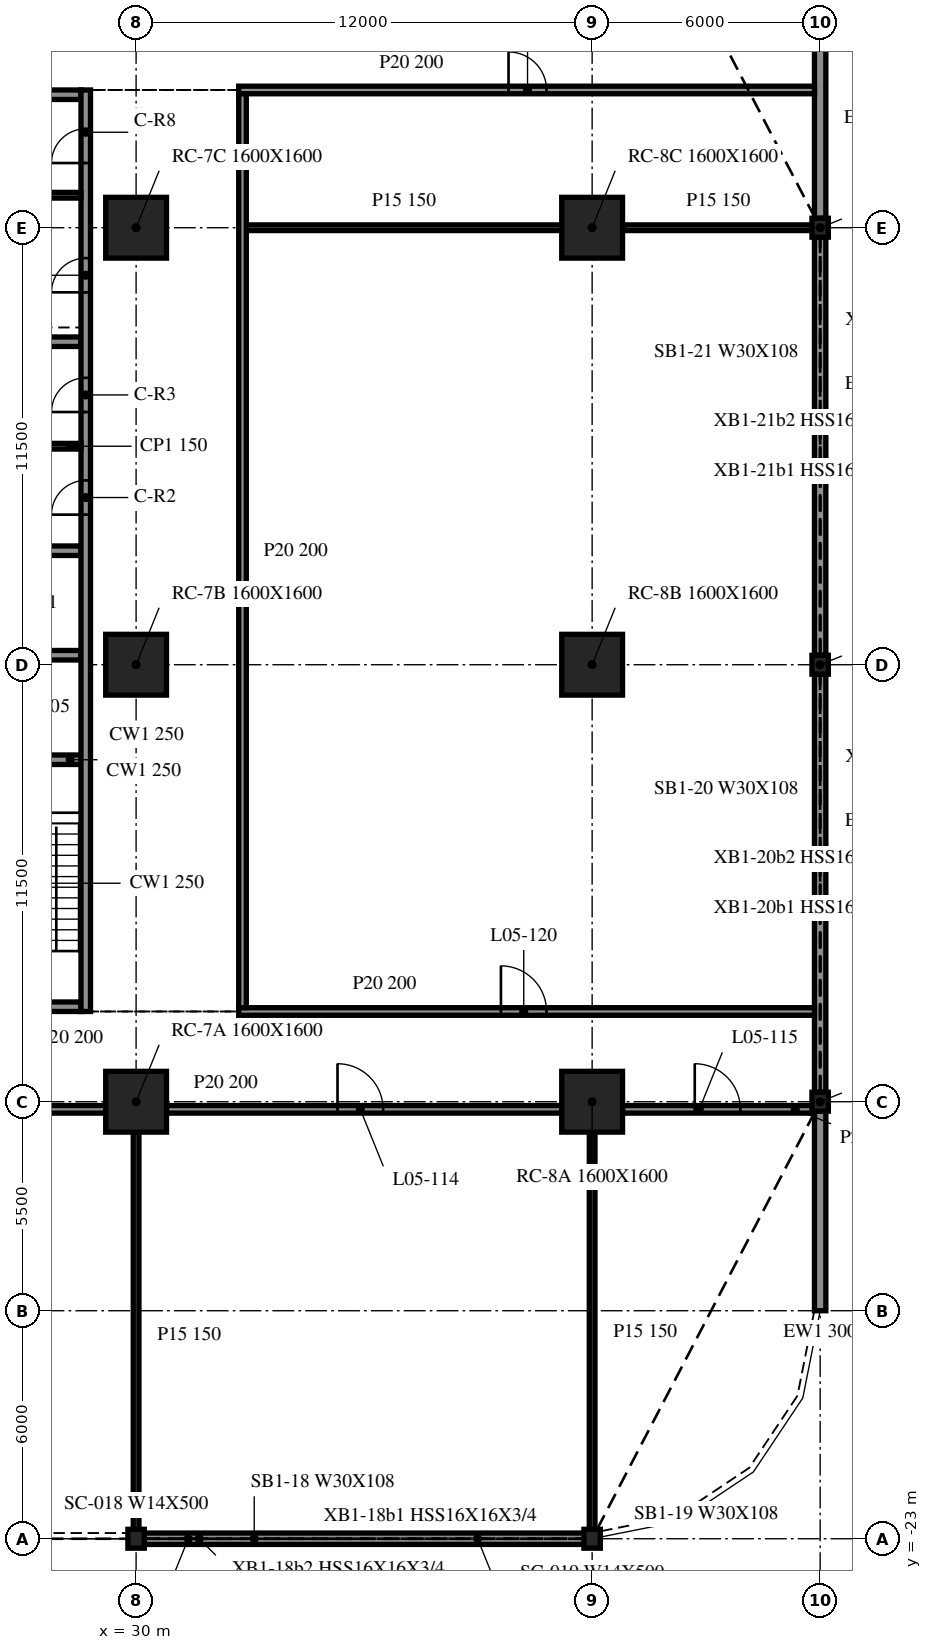
"""IFC4 building model, lengths in metres.
Left out: names, types, materials, properties, quantities, classifications, styles, units other than length and angle.
Written with IfcOpenShell. Run it as: python <this file> out.ifc"""

import sys

from ifc_helpers import new_model, si_unit, direction, frame, frame_2d, origin, origin_2d, place, context, subcontext, project, spatial, rectangle, i_section, extrude, element, fill, save


model = new_model("IFC4")
c1 = context("Model", 3, precision=1e-05, world=origin(), true_north=direction((0.0, 1.0)))
c2 = subcontext(c1, "Body", "Model", "MODEL_VIEW")
j1 = project(units=[si_unit("LENGTHUNIT", "METRE"), si_unit("PLANEANGLEUNIT", "RADIAN")], contexts=[c1])
p1 = place(None, origin())
s1 = spatial("IfcSite", under=j1, at=p1, CompositionType="ELEMENT")
p2 = place(p1, origin())
s2 = spatial("IfcBuilding", under=s1, at=p2, CompositionType="ELEMENT")
p3 = place(p2, frame((0.0, 0.0, 24.4)))
s3 = spatial("IfcBuildingStorey", under=s2, at=p3, CompositionType="ELEMENT", Elevation=24.4)
for number, where, z_axis, x_axis in (
    (1, (30.0, -11.5, -0.34), (0.0, 0.0, 1.0), (1.0, 0.0, 0.0)),
    (2, (30.0, 0.0, -0.34), (0.0, 0.0, 1.0), (1.0, 0.0, 0.0)),
    (3, (30.0, 11.5, -0.34), (0.0, 0.0, 1.0), (1.0, 0.0, 0.0)),
    (4, (42.0, -11.5, -0.34), (0.0, 0.0, 1.0), (1.0, 0.0, 0.0)),
    (5, (42.0, 0.0, -0.34), (0.0, 0.0, 1.0), (1.0, 0.0, 0.0)),
    (6, (42.0, 11.5, -0.34), (0.0, 0.0, 1.0), (1.0, 0.0, 0.0)),
):
    element("IfcColumn", number, at=place(p3, frame(where, z_axis=z_axis, x_axis=x_axis)), inside=s3, PredefinedType="COLUMN", context=c2, shape_type="SweptSolid", body=[
        extrude(rectangle(XDim=1.6, YDim=1.6, at=origin_2d()), origin(), (0.0, 0.0, 1.0), 4.3),
    ])
for number, where, z_axis, x_axis in (
    (7, (30.0, -23.0, -0.34), (0.0, 0.0, 1.0), (1.0, 0.0, 0.0)),
    (8, (42.0, -23.0, -0.34), (0.0, 0.0, 1.0), (1.0, 0.0, 0.0)),
    (9, (48.0, -11.5, -0.34), (0.0, 0.0, 1.0), (1.0, 0.0, 0.0)),
    (10, (48.0, 0.0, -0.34), (0.0, 0.0, 1.0), (1.0, 0.0, 0.0)),
    (11, (48.0, 11.5, -0.34), (0.0, 0.0, 1.0), (1.0, 0.0, 0.0)),
):
    element("IfcColumn", number, at=place(p3, frame(where, z_axis=z_axis, x_axis=x_axis)), inside=s3, PredefinedType="COLUMN", context=c2, shape_type="SweptSolid", body=[
        extrude(i_section(OverallWidth=0.432, OverallDepth=0.498, WebThickness=0.056, FlangeThickness=0.089, at=origin_2d()), origin(), (0.0, 0.0, 1.0), 4.3),
    ])
p4 = place(p3, frame((30.028, -23.0, 0.0), z_axis=(0.0, 0.0, 1.0), x_axis=(1.0, 0.0, 0.0)))
e12 = element("IfcWall", 12, at=p4, inside=s3, PredefinedType="NOTDEFINED", context=c2, shape_type="SweptSolid", body=[
    extrude(rectangle(XDim=11.944, YDim=0.3, at=frame_2d((5.972, 0.0))), origin(), (0.0, 0.0, 1.0), 3.203),
])
p5 = place(p3, frame((48.0, -17.0, 0.0), z_axis=(0.0, 0.0, 1.0), x_axis=(0.0, 1.0, 0.0)))
e13 = element("IfcWall", 13, at=p5, inside=s3, PredefinedType="NOTDEFINED", context=c2, shape_type="SweptSolid", body=[
    extrude(rectangle(XDim=5.251, YDim=0.3, at=frame_2d((2.625, 0.0))), origin(), (0.0, 0.0, 1.0), 3.203),
])
for number, where, z_axis, x_axis in (
    (14, (48.0, -11.251, 0.0), (0.0, 0.0, 1.0), (0.0, 1.0, 0.0)),
    (15, (48.0, 0.249, 0.0), (0.0, 0.0, 1.0), (0.0, 1.0, 0.0)),
):
    element("IfcWall", number, at=place(p3, frame(where, z_axis=z_axis, x_axis=x_axis)), inside=s3, PredefinedType="NOTDEFINED", context=c2, shape_type="SweptSolid", body=[
        extrude(rectangle(XDim=11.002, YDim=0.3, at=frame_2d((5.501, 0.0))), origin(), (0.0, 0.0, 1.0), 3.203),
    ])
p6 = place(p3, frame((48.0, 11.749, 0.0), z_axis=(0.0, 0.0, 1.0), x_axis=(0.0, 1.0, 0.0)))
e16 = element("IfcWall", 16, at=p6, inside=s3, PredefinedType="NOTDEFINED", context=c2, shape_type="SweptSolid", body=[
    extrude(rectangle(XDim=5.251, YDim=0.3, at=frame_2d((2.625, 0.0))), origin(), (0.0, 0.0, 1.0), 3.203),
])
p7 = place(p3, frame((28.675, -9.125, 0.0), z_axis=(0.0, 0.0, 1.0), x_axis=(0.0, 1.0, 0.0)))
e17 = element("IfcWall", 17, at=p7, inside=s3, PredefinedType="SOLIDWALL", context=c2, shape_type="SweptSolid", body=[
    extrude(rectangle(XDim=24.25, YDim=0.25, at=frame_2d((12.125, 0.0))), origin(), (0.0, 0.0, 1.0), 3.96),
])
p8 = place(p7, frame((13.075, 0.0, 0.0)))
e18 = element("IfcOpeningElement", 18, at=p8, cuts=e17, PredefinedType="OPENING", context=c2, shape_type="SweptSolid", body=[
    extrude(rectangle(XDim=0.9, YDim=2.1, at=frame_2d((0.45, 1.05))), frame((0.0, 0.135, 0.0), z_axis=(0.0, -1.0, 0.0), x_axis=(1.0, 0.0, 0.0)), (0.0, 0.0, 1.0), 0.27),
])
p9 = place(p7, frame((15.775, 0.0, 0.0)))
e19 = element("IfcOpeningElement", 19, at=p9, cuts=e17, PredefinedType="OPENING", context=c2, shape_type="SweptSolid", body=[
    extrude(rectangle(XDim=0.9, YDim=2.1, at=frame_2d((0.45, 1.05))), frame((0.0, 0.135, 0.0), z_axis=(0.0, -1.0, 0.0), x_axis=(1.0, 0.0, 0.0)), (0.0, 0.0, 1.0), 0.27),
])
p10 = place(p7, frame((18.925, 0.0, 0.0)))
e20 = element("IfcOpeningElement", 20, at=p10, cuts=e17, PredefinedType="OPENING", context=c2, shape_type="SweptSolid", body=[
    extrude(rectangle(XDim=0.9, YDim=2.1, at=frame_2d((0.45, 1.05))), frame((0.0, 0.135, 0.0), z_axis=(0.0, -1.0, 0.0), x_axis=(1.0, 0.0, 0.0)), (0.0, 0.0, 1.0), 0.27),
])
p11 = place(p7, frame((22.327, 0.0, 0.0)))
e21 = element("IfcOpeningElement", 21, at=p11, cuts=e17, PredefinedType="OPENING", context=c2, shape_type="SweptSolid", body=[
    extrude(rectangle(XDim=0.9, YDim=2.1, at=frame_2d((0.45, 1.05))), frame((0.0, 0.135, 0.0), z_axis=(0.0, -1.0, 0.0), x_axis=(1.0, 0.0, 0.0)), (0.0, 0.0, 1.0), 0.27),
])
p12 = place(p3, frame((28.55, -9.0, 0.0), z_axis=(0.0, 0.0, 1.0), x_axis=(-1.0, 0.0, 0.0)))
e22 = element("IfcWall", 22, at=p12, inside=s3, PredefinedType="SOLIDWALL", context=c2, shape_type="SweptSolid", body=[
    extrude(rectangle(XDim=9.1, YDim=0.25, at=frame_2d((4.55, 0.0))), origin(), (0.0, 0.0, 1.0), 3.96),
])
p13 = place(p12, frame((3.65, 0.0, 0.0)))
e23 = element("IfcOpeningElement", 23, at=p13, cuts=e22, PredefinedType="OPENING", context=c2, shape_type="SweptSolid", body=[
    extrude(rectangle(XDim=1.8, YDim=2.1, at=frame_2d((0.9, 1.05))), frame((0.0, 0.135, 0.0), z_axis=(0.0, -1.0, 0.0), x_axis=(1.0, 0.0, 0.0)), (0.0, 0.0, 1.0), 0.27),
])
p14 = place(p3, frame((19.45, 15.0, 0.0), z_axis=(0.0, 0.0, 1.0), x_axis=(1.0, 0.0, 0.0)))
e24 = element("IfcWall", 24, at=p14, inside=s3, PredefinedType="SOLIDWALL", context=c2, shape_type="SweptSolid", body=[
    extrude(rectangle(XDim=9.1, YDim=0.25, at=frame_2d((4.55, 0.0))), origin(), (0.0, 0.0, 1.0), 3.96),
])
p15 = place(p14, frame((3.65, 0.0, 0.0)))
e25 = element("IfcOpeningElement", 25, at=p15, cuts=e24, PredefinedType="OPENING", context=c2, shape_type="SweptSolid", body=[
    extrude(rectangle(XDim=1.8, YDim=2.1, at=frame_2d((0.9, 1.05))), frame((0.0, 0.135, 0.0), z_axis=(0.0, -1.0, 0.0), x_axis=(1.0, 0.0, 0.0)), (0.0, 0.0, 1.0), 0.27),
])
for number, where, z_axis, x_axis in (
    (26, (25.7, -2.5, 0.0), (0.0, 0.0, 1.0), (1.0, 0.0, 0.0)),
    (27, (25.7, 0.25, 0.0), (0.0, 0.0, 1.0), (1.0, 0.0, 0.0)),
    (28, (25.7, 3.0, 0.0), (0.0, 0.0, 1.0), (1.0, 0.0, 0.0)),
    (29, (25.7, 8.5, 0.0), (0.0, 0.0, 1.0), (1.0, 0.0, 0.0)),
):
    element("IfcWall", number, at=place(p3, frame(where, z_axis=z_axis, x_axis=x_axis)), inside=s3, PredefinedType="SOLIDWALL", context=c2, shape_type="SweptSolid", body=[
        extrude(rectangle(XDim=2.85, YDim=0.25, at=frame_2d((1.425, 0.0))), origin(), (0.0, 0.0, 1.0), 3.96),
    ])
for number, where, z_axis, x_axis in (
    (30, (25.7, 5.75, 0.0), (0.0, 0.0, 1.0), (1.0, 0.0, 0.0)),
    (31, (25.7, 12.355, 0.0), (0.0, 0.0, 1.0), (1.0, 0.0, 0.0)),
):
    element("IfcWall", number, at=place(p3, frame(where, z_axis=z_axis, x_axis=x_axis)), inside=s3, PredefinedType="PARTITIONING", context=c2, shape_type="SweptSolid", body=[
        extrude(rectangle(XDim=2.85, YDim=0.15, at=frame_2d((1.425, 0.0))), origin(), (0.0, 0.0, 1.0), 3.96),
    ])
p16 = place(p3, frame((18.8, -11.7, 0.0), z_axis=(0.0, 0.0, 1.0), x_axis=(1.0, 0.0, 0.0)))
e32 = element("IfcWall", 32, at=p16, inside=s3, PredefinedType="PARTITIONING", context=c2, shape_type="SweptSolid", body=[
    extrude(rectangle(XDim=10.4, YDim=0.2, at=frame_2d((5.2, 0.0))), origin(), (0.0, 0.0, 1.0), 3.96),
])
p17 = place(p16, frame((0.9, 0.0, 0.0)))
e33 = element("IfcOpeningElement", 33, at=p17, cuts=e32, PredefinedType="OPENING", context=c2, shape_type="SweptSolid", body=[
    extrude(rectangle(XDim=1.0, YDim=2.1, at=frame_2d((0.5, 1.05))), frame((0.0, 0.11, 0.0), z_axis=(0.0, -1.0, 0.0), x_axis=(1.0, 0.0, 0.0)), (0.0, 0.0, 1.0), 0.22),
])
p18 = place(p16, frame((3.7, 0.0, 0.0)))
e34 = element("IfcOpeningElement", 34, at=p18, cuts=e32, PredefinedType="OPENING", context=c2, shape_type="SweptSolid", body=[
    extrude(rectangle(XDim=1.2, YDim=2.1, at=frame_2d((0.6, 1.05))), frame((0.0, 0.11, 0.0), z_axis=(0.0, -1.0, 0.0), x_axis=(1.0, 0.0, 0.0)), (0.0, 0.0, 1.0), 0.22),
])
p19 = place(p16, frame((5.5, 0.0, 0.0)))
e35 = element("IfcOpeningElement", 35, at=p19, cuts=e32, PredefinedType="OPENING", context=c2, shape_type="SweptSolid", body=[
    extrude(rectangle(XDim=1.2, YDim=2.1, at=frame_2d((0.6, 1.05))), frame((0.0, 0.11, 0.0), z_axis=(0.0, -1.0, 0.0), x_axis=(1.0, 0.0, 0.0)), (0.0, 0.0, 1.0), 0.22),
])
p20 = place(p3, frame((30.8, -11.7, 0.0), z_axis=(0.0, 0.0, 1.0), x_axis=(1.0, 0.0, 0.0)))
e36 = element("IfcWall", 36, at=p20, inside=s3, PredefinedType="PARTITIONING", context=c2, shape_type="SweptSolid", body=[
    extrude(rectangle(XDim=10.4, YDim=0.2, at=frame_2d((5.2, 0.0))), origin(), (0.0, 0.0, 1.0), 3.96),
])
p21 = place(p20, frame((4.5, 0.0, 0.0)))
e37 = element("IfcOpeningElement", 37, at=p21, cuts=e36, PredefinedType="OPENING", context=c2, shape_type="SweptSolid", body=[
    extrude(rectangle(XDim=1.2, YDim=2.1, at=frame_2d((0.6, 1.05))), frame((0.0, 0.11, 0.0), z_axis=(0.0, -1.0, 0.0), x_axis=(1.0, 0.0, 0.0)), (0.0, 0.0, 1.0), 0.22),
])
p22 = place(p3, frame((42.8, -11.7, 0.0), z_axis=(0.0, 0.0, 1.0), x_axis=(1.0, 0.0, 0.0)))
e38 = element("IfcWall", 38, at=p22, inside=s3, PredefinedType="PARTITIONING", context=c2, shape_type="SweptSolid", body=[
    extrude(rectangle(XDim=5.05, YDim=0.2, at=frame_2d((2.525, 0.0))), origin(), (0.0, 0.0, 1.0), 3.96),
])
p23 = place(p22, frame((1.9, 0.0, 0.0)))
e39 = element("IfcOpeningElement", 39, at=p23, cuts=e38, PredefinedType="OPENING", context=c2, shape_type="SweptSolid", body=[
    extrude(rectangle(XDim=1.2, YDim=2.1, at=frame_2d((0.6, 1.05))), frame((0.0, 0.11, 0.0), z_axis=(0.0, -1.0, 0.0), x_axis=(1.0, 0.0, 0.0)), (0.0, 0.0, 1.0), 0.22),
])
p24 = place(p3, frame((32.7, -9.125, 0.0), z_axis=(0.0, 0.0, 1.0), x_axis=(1.0, 0.0, 0.0)))
e40 = element("IfcWall", 40, at=p24, inside=s3, PredefinedType="PARTITIONING", context=c2, shape_type="SweptSolid", body=[
    extrude(rectangle(XDim=15.15, YDim=0.2, at=frame_2d((7.575, 0.0))), origin(), (0.0, 0.0, 1.0), 3.96),
])
p25 = place(p24, frame((6.9, 0.0, 0.0)))
e41 = element("IfcOpeningElement", 41, at=p25, cuts=e40, PredefinedType="OPENING", context=c2, shape_type="SweptSolid", body=[
    extrude(rectangle(XDim=1.2, YDim=2.1, at=frame_2d((0.6, 1.05))), frame((0.0, 0.11, 0.0), z_axis=(0.0, -1.0, 0.0), x_axis=(1.0, 0.0, 0.0)), (0.0, 0.0, 1.0), 0.22),
])
p26 = place(p3, frame((32.9, 11.5, 0.0), z_axis=(0.0, 0.0, 1.0), x_axis=(1.0, 0.0, 0.0)))
e42 = element("IfcWall", 42, at=p26, inside=s3, PredefinedType="PARTITIONING", context=c2, shape_type="SweptSolid", body=[
    extrude(rectangle(XDim=8.3, YDim=0.15, at=frame_2d((4.15, 0.0))), origin(), (0.0, 0.0, 1.0), 3.96),
])
p27 = place(p3, frame((42.8, 11.5, 0.0), z_axis=(0.0, 0.0, 1.0), x_axis=(1.0, 0.0, 0.0)))
e43 = element("IfcWall", 43, at=p27, inside=s3, PredefinedType="PARTITIONING", context=c2, shape_type="SweptSolid", body=[
    extrude(rectangle(XDim=5.05, YDim=0.15, at=frame_2d((2.525, 0.0))), origin(), (0.0, 0.0, 1.0), 3.96),
])
p28 = place(p3, frame((32.7, 15.125, 0.0), z_axis=(0.0, 0.0, 1.0), x_axis=(1.0, 0.0, 0.0)))
e44 = element("IfcWall", 44, at=p28, inside=s3, PredefinedType="PARTITIONING", context=c2, shape_type="SweptSolid", body=[
    extrude(rectangle(XDim=15.15, YDim=0.2, at=frame_2d((7.575, 0.0))), origin(), (0.0, 0.0, 1.0), 3.96),
])
p29 = place(p28, frame((7.1, 0.0, 0.0)))
e45 = element("IfcOpeningElement", 45, at=p29, cuts=e44, PredefinedType="OPENING", context=c2, shape_type="SweptSolid", body=[
    extrude(rectangle(XDim=1.0, YDim=2.1, at=frame_2d((0.5, 1.05))), frame((0.0, 0.11, 0.0), z_axis=(0.0, -1.0, 0.0), x_axis=(1.0, 0.0, 0.0)), (0.0, 0.0, 1.0), 0.22),
])
p30 = place(p3, frame((30.0, -22.975, 0.0), z_axis=(0.0, 0.0, 1.0), x_axis=(0.0, 1.0, 0.0)))
e46 = element("IfcWall", 46, at=p30, inside=s3, PredefinedType="PARTITIONING", context=c2, shape_type="SweptSolid", body=[
    extrude(rectangle(XDim=10.675, YDim=0.15, at=frame_2d((5.337, 0.0))), origin(), (0.0, 0.0, 1.0), 3.96),
])
p31 = place(p3, frame((32.8, -9.025, 0.0), z_axis=(0.0, 0.0, 1.0), x_axis=(0.0, 1.0, 0.0)))
e47 = element("IfcWall", 47, at=p31, inside=s3, PredefinedType="PARTITIONING", context=c2, shape_type="SweptSolid", body=[
    extrude(rectangle(XDim=24.05, YDim=0.2, at=frame_2d((12.025, 0.0))), origin(), (0.0, 0.0, 1.0), 3.96),
])
p32 = place(p3, frame((42.0, -22.847, 0.0), z_axis=(0.0, 0.0, 1.0), x_axis=(0.0, 1.0, 0.0)))
e48 = element("IfcWall", 48, at=p32, inside=s3, PredefinedType="PARTITIONING", context=c2, shape_type="SweptSolid", body=[
    extrude(rectangle(XDim=10.547, YDim=0.15, at=frame_2d((5.273, 0.0))), origin(), (0.0, 0.0, 1.0), 3.96),
])
p33 = place(p8, origin())
e49 = element("IfcDoor", 49, at=p33, inside=s3, OperationType="SINGLE_SWING_RIGHT", PredefinedType="DOOR", context=c2, shape_type="SweptSolid", body=[
    extrude(rectangle(XDim=0.9, YDim=2.1, at=frame_2d((0.45, 1.05))), frame((0.0, 0.025, 0.0), z_axis=(0.0, -1.0, 0.0), x_axis=(1.0, 0.0, 0.0)), (0.0, 0.0, 1.0), 0.05),
])
fill(e18, e49)
p34 = place(p9, origin())
e50 = element("IfcDoor", 50, at=p34, inside=s3, OperationType="SINGLE_SWING_LEFT", PredefinedType="DOOR", context=c2, shape_type="SweptSolid", body=[
    extrude(rectangle(XDim=0.9, YDim=2.1, at=frame_2d((0.45, 1.05))), frame((0.0, 0.025, 0.0), z_axis=(0.0, -1.0, 0.0), x_axis=(1.0, 0.0, 0.0)), (0.0, 0.0, 1.0), 0.05),
])
fill(e19, e50)
p35 = place(p10, origin())
e51 = element("IfcDoor", 51, at=p35, inside=s3, OperationType="SINGLE_SWING_LEFT", PredefinedType="DOOR", context=c2, shape_type="SweptSolid", body=[
    extrude(rectangle(XDim=0.9, YDim=2.1, at=frame_2d((0.45, 1.05))), frame((0.0, 0.025, 0.0), z_axis=(0.0, -1.0, 0.0), x_axis=(1.0, 0.0, 0.0)), (0.0, 0.0, 1.0), 0.05),
])
fill(e20, e51)
p36 = place(p11, origin())
e52 = element("IfcDoor", 52, at=p36, inside=s3, OperationType="SINGLE_SWING_RIGHT", PredefinedType="DOOR", context=c2, shape_type="SweptSolid", body=[
    extrude(rectangle(XDim=0.9, YDim=2.1, at=frame_2d((0.45, 1.05))), frame((0.0, 0.025, 0.0), z_axis=(0.0, -1.0, 0.0), x_axis=(1.0, 0.0, 0.0)), (0.0, 0.0, 1.0), 0.05),
])
fill(e21, e52)
p37 = place(p21, origin())
e53 = element("IfcDoor", 53, at=p37, inside=s3, OperationType="SINGLE_SWING_RIGHT", PredefinedType="DOOR", context=c2, shape_type="SweptSolid", body=[
    extrude(rectangle(XDim=1.2, YDim=2.1, at=frame_2d((0.6, 1.05))), frame((0.0, 0.025, 0.0), z_axis=(0.0, -1.0, 0.0), x_axis=(1.0, 0.0, 0.0)), (0.0, 0.0, 1.0), 0.05),
])
fill(e37, e53)
p38 = place(p23, origin())
e54 = element("IfcDoor", 54, at=p38, inside=s3, OperationType="SINGLE_SWING_RIGHT", PredefinedType="DOOR", context=c2, shape_type="SweptSolid", body=[
    extrude(rectangle(XDim=1.2, YDim=2.1, at=frame_2d((0.6, 1.05))), frame((0.0, 0.025, 0.0), z_axis=(0.0, -1.0, 0.0), x_axis=(1.0, 0.0, 0.0)), (0.0, 0.0, 1.0), 0.05),
])
fill(e39, e54)
p39 = place(p25, origin())
e55 = element("IfcDoor", 55, at=p39, inside=s3, OperationType="SINGLE_SWING_LEFT", PredefinedType="DOOR", context=c2, shape_type="SweptSolid", body=[
    extrude(rectangle(XDim=1.2, YDim=2.1, at=frame_2d((0.6, 1.05))), frame((0.0, 0.025, 0.0), z_axis=(0.0, -1.0, 0.0), x_axis=(1.0, 0.0, 0.0)), (0.0, 0.0, 1.0), 0.05),
])
fill(e41, e55)
p40 = place(p29, origin())
e56 = element("IfcDoor", 56, at=p40, inside=s3, OperationType="SINGLE_SWING_LEFT", PredefinedType="DOOR", context=c2, shape_type="SweptSolid", body=[
    extrude(rectangle(XDim=1.0, YDim=2.1, at=frame_2d((0.5, 1.05))), frame((0.0, 0.025, 0.0), z_axis=(0.0, -1.0, 0.0), x_axis=(1.0, 0.0, 0.0)), (0.0, 0.0, 1.0), 0.05),
])
fill(e45, e56)
save(model, sys.argv[1])
